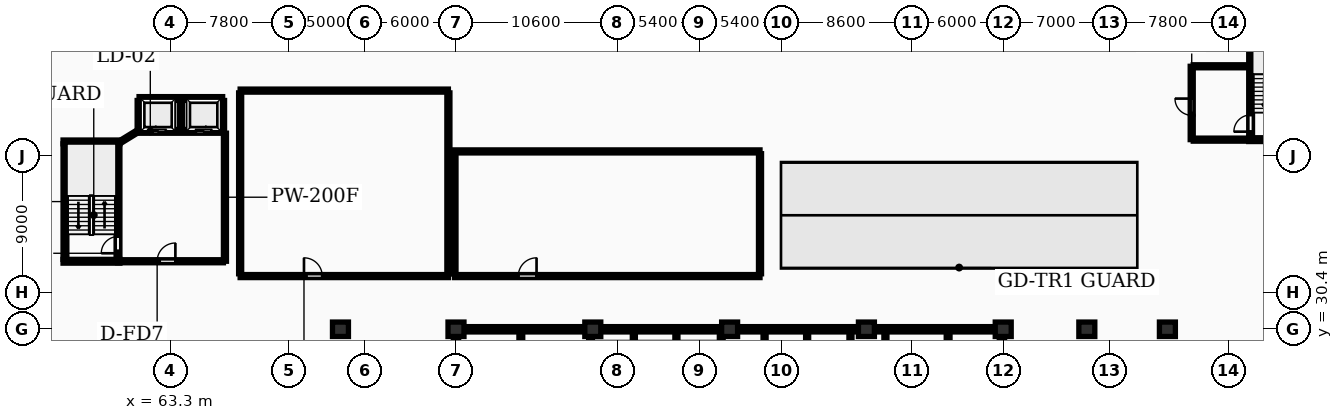
"""IFC4 building model, lengths in metres.
Left out: names, types, materials, properties, quantities, classifications, styles, units other than length and angle.
Written with IfcOpenShell. Run it as: python <this file> out.ifc"""

import sys

from ifc_helpers import new_model, si_unit, direction, frame, frame_2d, origin, origin_2d, place, context, subcontext, project, spatial, rectangle, extrude, element, fill, save


model = new_model("IFC4")
c1 = context("Model", 3, precision=1e-05, world=origin(), true_north=direction((0.0, 1.0)))
c2 = subcontext(c1, "Body", "Model", "MODEL_VIEW")
j1 = project(units=[si_unit("LENGTHUNIT", "METRE"), si_unit("PLANEANGLEUNIT", "RADIAN")], contexts=[c1])
p1 = place(None, origin())
s1 = spatial("IfcSite", under=j1, at=p1, CompositionType="ELEMENT")
p2 = place(p1, origin())
s2 = spatial("IfcBuilding", under=s1, at=p2, CompositionType="ELEMENT")
p3 = place(p2, frame((0.0, 0.0, -10.8)))
s3 = spatial("IfcBuildingStorey", under=s2, at=p3, CompositionType="ELEMENT", Elevation=-10.8)
for number, where, z_axis, x_axis in (
    (1, (74.5, 30.4, -0.45), (0.0, 0.0, 1.0), (1.0, 0.0, 0.0)),
    (2, (82.1, 30.4, -0.45), (0.0, 0.0, 1.0), (1.0, 0.0, 0.0)),
    (3, (91.1, 30.4, -0.45), (0.0, 0.0, 1.0), (1.0, 0.0, 0.0)),
    (4, (100.1, 30.4, -0.45), (0.0, 0.0, 1.0), (1.0, 0.0, 0.0)),
    (5, (109.1, 30.4, -0.45), (0.0, 0.0, 1.0), (1.0, 0.0, 0.0)),
    (6, (118.1, 30.4, -0.45), (0.0, 0.0, 1.0), (1.0, 0.0, 0.0)),
    (7, (123.6, 30.4, -0.45), (0.0, 0.0, 1.0), (1.0, 0.0, 0.0)),
    (8, (128.9, 30.4, -0.45), (0.0, 0.0, 1.0), (1.0, 0.0, 0.0)),
):
    element("IfcColumn", number, at=place(p3, frame(where, z_axis=z_axis, x_axis=x_axis)), inside=s3, PredefinedType="COLUMN", context=c2, shape_type="SweptSolid", body=[
        extrude(rectangle(XDim=1.05, YDim=0.95, at=origin_2d()), origin(), (0.0, 0.0, 1.0), 4.05),
    ])
p4 = place(p3, frame((81.925, 30.4, 0.0), z_axis=(0.0, 0.0, 1.0), x_axis=(1.0, 0.0, 0.0)))
e9 = element("IfcWall", 9, at=p4, inside=s3, PredefinedType="SHEAR", context=c2, shape_type="SweptSolid", body=[
    extrude(rectangle(XDim=36.265, YDim=0.35, at=frame_2d((18.132, 0.0))), origin(), (0.0, 0.0, 1.0), 3.6),
])
for number, where, z_axis, x_axis in (
    (10, (82.1, 18.575, 0.0), (0.0, 0.0, 1.0), (0.0, 1.0, 0.0)),
    (11, (118.015, 18.575, 0.0), (0.0, 0.0, 1.0), (0.0, 1.0, 0.0)),
):
    element("IfcWall", number, at=place(p3, frame(where, z_axis=z_axis, x_axis=x_axis)), inside=s3, PredefinedType="SHEAR", context=c2, shape_type="SweptSolid", body=[
        extrude(rectangle(XDim=11.65, YDim=0.35, at=frame_2d((5.825, 0.0))), origin(), (0.0, 0.0, 1.0), 3.6),
    ])
p5 = place(p3, frame((86.365, 18.6, 0.0), z_axis=(0.0, 0.0, 1.0), x_axis=(0.0, 1.0, 0.0)))
e12 = element("IfcWall", 12, at=p5, inside=s3, PredefinedType="SHEAR", context=c2, shape_type="SweptSolid", body=[
    extrude(rectangle(XDim=11.6, YDim=0.25, at=frame_2d((5.8, 0.0))), origin(), (0.0, 0.0, 1.0), 3.6),
])
p6 = place(p5, frame((0.45, 0.0, 0.0)))
e13 = element("IfcOpeningElement", 13, at=p6, cuts=e12, PredefinedType="OPENING", context=c2, shape_type="SweptSolid", body=[
    extrude(rectangle(XDim=0.85, YDim=2.05, at=frame_2d((0.425, 1.025))), frame((0.0, 0.135, 0.0), z_axis=(0.0, -1.0, 0.0), x_axis=(1.0, 0.0, 0.0)), (0.0, 0.0, 1.0), 0.27),
])
p7 = place(p5, frame((2.05, 0.0, 0.0)))
e14 = element("IfcOpeningElement", 14, at=p7, cuts=e12, PredefinedType="OPENING", context=c2, shape_type="SweptSolid", body=[
    extrude(rectangle(XDim=1.1, YDim=2.1, at=frame_2d((0.55, 1.05))), frame((0.0, 0.135, 0.0), z_axis=(0.0, -1.0, 0.0), x_axis=(1.0, 0.0, 0.0)), (0.0, 0.0, 1.0), 0.27),
])
p8 = place(p5, frame((9.95, 0.0, 0.0)))
e15 = element("IfcOpeningElement", 15, at=p8, cuts=e12, PredefinedType="OPENING", context=c2, shape_type="SweptSolid", body=[
    extrude(rectangle(XDim=0.85, YDim=2.05, at=frame_2d((0.425, 1.025))), frame((0.0, 0.135, 0.0), z_axis=(0.0, -1.0, 0.0), x_axis=(1.0, 0.0, 0.0)), (0.0, 0.0, 1.0), 0.27),
])
p9 = place(p3, frame((90.95, 18.6, 0.0), z_axis=(0.0, 0.0, 1.0), x_axis=(0.0, 1.0, 0.0)))
e16 = element("IfcWall", 16, at=p9, inside=s3, PredefinedType="SHEAR", context=c2, shape_type="SweptSolid", body=[
    extrude(rectangle(XDim=11.6, YDim=0.25, at=frame_2d((5.8, 0.0))), origin(), (0.0, 0.0, 1.0), 3.6),
])
p10 = place(p9, frame((4.6, 0.0, 0.0)))
e17 = element("IfcOpeningElement", 17, at=p10, cuts=e16, PredefinedType="OPENING", context=c2, shape_type="SweptSolid", body=[
    extrude(rectangle(XDim=1.1, YDim=2.1, at=frame_2d((0.55, 1.05))), frame((0.0, 0.135, 0.0), z_axis=(0.0, -1.0, 0.0), x_axis=(1.0, 0.0, 0.0)), (0.0, 0.0, 1.0), 0.27),
])
for number, where, z_axis, x_axis in (
    (18, (93.8, 27.38, 0.0), (0.0, 0.0, 1.0), (0.0, 1.0, 0.0)),
    (19, (96.6, 27.38, 0.0), (0.0, 0.0, 1.0), (0.0, 1.0, 0.0)),
):
    element("IfcWall", number, at=place(p3, frame(where, z_axis=z_axis, x_axis=x_axis)), inside=s3, PredefinedType="PARTITIONING", context=c2, shape_type="SweptSolid", body=[
        extrude(rectangle(XDim=2.82, YDim=0.2, at=frame_2d((1.41, 0.0))), origin(), (0.0, 0.0, 1.0), 3.3),
    ])
p11 = place(p3, frame((99.55, 27.25, 0.0), z_axis=(0.0, 0.0, 1.0), x_axis=(0.0, 1.0, 0.0)))
e20 = element("IfcWall", 20, at=p11, inside=s3, PredefinedType="SHEAR", context=c2, shape_type="SweptSolid", body=[
    extrude(rectangle(XDim=2.95, YDim=0.25, at=frame_2d((1.475, 0.0))), origin(), (0.0, 0.0, 1.0), 3.6),
])
for number, where, z_axis, x_axis in (
    (21, (102.4, 27.38, 0.0), (0.0, 0.0, 1.0), (0.0, 1.0, 0.0)),
    (22, (105.2, 27.38, 0.0), (0.0, 0.0, 1.0), (0.0, 1.0, 0.0)),
    (23, (108.05, 27.38, 0.0), (0.0, 0.0, 1.0), (0.0, 1.0, 0.0)),
):
    element("IfcWall", number, at=place(p3, frame(where, z_axis=z_axis, x_axis=x_axis)), inside=s3, PredefinedType="PARTITIONING", context=c2, shape_type="SweptSolid", body=[
        extrude(rectangle(XDim=2.82, YDim=0.2, at=frame_2d((1.41, 0.0))), origin(), (0.0, 0.0, 1.0), 3.3),
    ])
p12 = place(p3, frame((110.35, 18.6, 0.0), z_axis=(0.0, 0.0, 1.0), x_axis=(0.0, 1.0, 0.0)))
e24 = element("IfcWall", 24, at=p12, inside=s3, PredefinedType="PARTITIONING", context=c2, shape_type="SweptSolid", body=[
    extrude(rectangle(XDim=11.6, YDim=0.2, at=frame_2d((5.8, 0.0))), origin(), (0.0, 0.0, 1.0), 3.3),
])
p13 = place(p12, frame((5.2, 0.0, 0.0)))
e25 = element("IfcOpeningElement", 25, at=p13, cuts=e24, PredefinedType="OPENING", context=c2, shape_type="SweptSolid", body=[
    extrude(rectangle(XDim=1.1, YDim=2.15, at=frame_2d((0.55, 1.075))), frame((0.0, 0.11, 0.0), z_axis=(0.0, -1.0, 0.0), x_axis=(1.0, 0.0, 0.0)), (0.0, 0.0, 1.0), 0.22),
])
p14 = place(p3, frame((114.475, 18.6, 0.0), z_axis=(0.0, 0.0, 1.0), x_axis=(0.0, 1.0, 0.0)))
e26 = element("IfcWall", 26, at=p14, inside=s3, PredefinedType="SHEAR", context=c2, shape_type="SweptSolid", body=[
    extrude(rectangle(XDim=11.6, YDim=0.25, at=frame_2d((5.8, 0.0))), origin(), (0.0, 0.0, 1.0), 3.6),
])
p15 = place(p14, frame((0.45, 0.0, 0.0)))
e27 = element("IfcOpeningElement", 27, at=p15, cuts=e26, PredefinedType="OPENING", context=c2, shape_type="SweptSolid", body=[
    extrude(rectangle(XDim=0.85, YDim=2.05, at=frame_2d((0.425, 1.025))), frame((0.0, 0.135, 0.0), z_axis=(0.0, -1.0, 0.0), x_axis=(1.0, 0.0, 0.0)), (0.0, 0.0, 1.0), 0.27),
])
p16 = place(p14, frame((2.05, 0.0, 0.0)))
e28 = element("IfcOpeningElement", 28, at=p16, cuts=e26, PredefinedType="OPENING", context=c2, shape_type="SweptSolid", body=[
    extrude(rectangle(XDim=1.1, YDim=2.1, at=frame_2d((0.55, 1.05))), frame((0.0, 0.135, 0.0), z_axis=(0.0, -1.0, 0.0), x_axis=(1.0, 0.0, 0.0)), (0.0, 0.0, 1.0), 0.27),
])
p17 = place(p14, frame((9.95, 0.0, 0.0)))
e29 = element("IfcOpeningElement", 29, at=p17, cuts=e26, PredefinedType="OPENING", context=c2, shape_type="SweptSolid", body=[
    extrude(rectangle(XDim=0.85, YDim=2.05, at=frame_2d((0.425, 1.025))), frame((0.0, 0.135, 0.0), z_axis=(0.0, -1.0, 0.0), x_axis=(1.0, 0.0, 0.0)), (0.0, 0.0, 1.0), 0.27),
])
p18 = place(p3, frame((56.375, 35.0, 0.0), z_axis=(0.0, 0.0, 1.0), x_axis=(0.0, 1.0, 0.0)))
e30 = element("IfcWall", 30, at=p18, inside=s3, PredefinedType="SHEAR", context=c2, shape_type="SweptSolid", body=[
    extrude(rectangle(XDim=7.6, YDim=0.25, at=frame_2d((3.8, 0.0))), origin(), (0.0, 0.0, 1.0), 3.6),
])
for number, where, z_axis, x_axis in (
    (31, (56.25, 42.725, 0.0), (0.0, 0.0, 1.0), (1.0, 0.0, 0.0)),
    (32, (56.25, 34.875, 0.0), (0.0, 0.0, 1.0), (1.0, 0.0, 0.0)),
):
    element("IfcWall", number, at=place(p3, frame(where, z_axis=z_axis, x_axis=x_axis)), inside=s3, PredefinedType="SHEAR", context=c2, shape_type="SweptSolid", body=[
        extrude(rectangle(XDim=3.74, YDim=0.25, at=frame_2d((1.87, 0.0))), origin(), (0.0, 0.0, 1.0), 3.6),
    ])
p19 = place(p3, frame((59.865, 35.0, 0.0), z_axis=(0.0, 0.0, 1.0), x_axis=(0.0, 1.0, 0.0)))
e33 = element("IfcWall", 33, at=p19, inside=s3, PredefinedType="SHEAR", context=c2, shape_type="SweptSolid", body=[
    extrude(rectangle(XDim=7.6, YDim=0.25, at=frame_2d((3.8, 0.0))), origin(), (0.0, 0.0, 1.0), 3.6),
])
p20 = place(p19, frame((0.4, 0.0, 0.0)))
e34 = element("IfcOpeningElement", 34, at=p20, cuts=e33, PredefinedType="OPENING", context=c2, shape_type="SweptSolid", body=[
    extrude(rectangle(XDim=1.1, YDim=2.1, at=frame_2d((0.55, 1.05))), frame((0.0, 0.135, 0.0), z_axis=(0.0, -1.0, 0.0), x_axis=(1.0, 0.0, 0.0)), (0.0, 0.0, 1.0), 0.27),
])
p21 = place(p3, frame((61.25, 43.42, 0.0), z_axis=(0.0, 0.0, 1.0), x_axis=(1.0, 0.0, 0.0)))
e35 = element("IfcWall", 35, at=p21, inside=s3, PredefinedType="SHEAR", context=c2, shape_type="SweptSolid", body=[
    extrude(rectangle(XDim=5.5, YDim=0.25, at=frame_2d((2.75, 0.0))), origin(), (0.0, 0.0, 1.0), 3.6),
])
p22 = place(p21, frame((0.74, 0.0, 0.0)))
e36 = element("IfcOpeningElement", 36, at=p22, cuts=e35, PredefinedType="OPENING", context=c2, shape_type="SweptSolid", body=[
    extrude(rectangle(XDim=1.02, YDim=2.12, at=frame_2d((0.51, 1.06))), frame((0.0, 0.135, 0.0), z_axis=(0.0, -1.0, 0.0), x_axis=(1.0, 0.0, 0.0)), (0.0, 0.0, 1.0), 0.27),
])
p23 = place(p21, frame((3.74, 0.0, 0.0)))
e37 = element("IfcOpeningElement", 37, at=p23, cuts=e35, PredefinedType="OPENING", context=c2, shape_type="SweptSolid", body=[
    extrude(rectangle(XDim=1.02, YDim=2.12, at=frame_2d((0.51, 1.06))), frame((0.0, 0.135, 0.0), z_axis=(0.0, -1.0, 0.0), x_axis=(1.0, 0.0, 0.0)), (0.0, 0.0, 1.0), 0.27),
])
p24 = place(p3, frame((61.25, 45.58, 0.0), z_axis=(0.0, 0.0, 1.0), x_axis=(1.0, 0.0, 0.0)))
e38 = element("IfcWall", 38, at=p24, inside=s3, PredefinedType="SHEAR", context=c2, shape_type="SweptSolid", body=[
    extrude(rectangle(XDim=5.5, YDim=0.25, at=frame_2d((2.75, 0.0))), origin(), (0.0, 0.0, 1.0), 3.6),
])
for number, where, z_axis, x_axis in (
    (39, (61.25, 43.55, 0.0), (0.0, 0.0, 1.0), (0.0, 1.0, 0.0)),
    (40, (66.75, 43.55, 0.0), (0.0, 0.0, 1.0), (0.0, 1.0, 0.0)),
):
    element("IfcWall", number, at=place(p3, frame(where, z_axis=z_axis, x_axis=x_axis)), inside=s3, PredefinedType="SHEAR", context=c2, shape_type="SweptSolid", body=[
        extrude(rectangle(XDim=1.9, YDim=0.25, at=frame_2d((0.95, 0.0))), origin(), (0.0, 0.0, 1.0), 3.6),
    ])
p25 = place(p3, frame((64.0, 43.55, 0.0), z_axis=(0.0, 0.0, 1.0), x_axis=(0.0, 1.0, 0.0)))
e41 = element("IfcWall", 41, at=p25, inside=s3, PredefinedType="PARTITIONING", context=c2, shape_type="SweptSolid", body=[
    extrude(rectangle(XDim=1.9, YDim=0.2, at=frame_2d((0.95, 0.0))), origin(), (0.0, 0.0, 1.0), 3.3),
])
p26 = place(p3, frame((59.84, 34.875, 0.0), z_axis=(0.0, 0.0, 1.0), x_axis=(1.0, 0.0, 0.0)))
e42 = element("IfcWall", 42, at=p26, inside=s3, PredefinedType="PARTITIONING", context=c2, shape_type="SweptSolid", body=[
    extrude(rectangle(XDim=6.96, YDim=0.2, at=frame_2d((3.48, 0.0))), origin(), (0.0, 0.0, 1.0), 3.3),
])
p27 = place(p26, frame((2.6, 0.0, 0.0)))
e43 = element("IfcOpeningElement", 43, at=p27, cuts=e42, PredefinedType="OPENING", context=c2, shape_type="SweptSolid", body=[
    extrude(rectangle(XDim=1.2, YDim=2.18, at=frame_2d((0.6, 1.09))), frame((0.0, 0.11, 0.0), z_axis=(0.0, -1.0, 0.0), x_axis=(1.0, 0.0, 0.0)), (0.0, 0.0, 1.0), 0.22),
])
p28 = place(p3, frame((66.9, 34.875, 0.0), z_axis=(0.0, 0.0, 1.0), x_axis=(0.0, 1.0, 0.0)))
e44 = element("IfcWall", 44, at=p28, inside=s3, PredefinedType="PARTITIONING", context=c2, shape_type="SweptSolid", body=[
    extrude(rectangle(XDim=8.425, YDim=0.2, at=frame_2d((4.212, 0.0))), origin(), (0.0, 0.0, 1.0), 3.3),
])
p29 = place(p3, frame((60.02, 42.725, 0.0), z_axis=(0.0, 0.0, 1.0), x_axis=(0.851822584555, 0.523830396638, 0.0)))
e45 = element("IfcWall", 45, at=p29, inside=s3, PredefinedType="PARTITIONING", context=c2, shape_type="SweptSolid", body=[
    extrude(rectangle(XDim=1.326, YDim=0.2, at=frame_2d((0.663, 0.0))), origin(), (0.0, 0.0, 1.0), 3.3),
])
p30 = place(p3, frame((134.375, 43.0, 0.0), z_axis=(0.0, 0.0, 1.0), x_axis=(0.0, 1.0, 0.0)))
e46 = element("IfcWall", 46, at=p30, inside=s3, PredefinedType="SHEAR", context=c2, shape_type="SweptSolid", body=[
    extrude(rectangle(XDim=7.6, YDim=0.25, at=frame_2d((3.8, 0.0))), origin(), (0.0, 0.0, 1.0), 3.6),
])
p31 = place(p30, frame((0.4, 0.0, 0.0)))
e47 = element("IfcOpeningElement", 47, at=p31, cuts=e46, PredefinedType="OPENING", context=c2, shape_type="SweptSolid", body=[
    extrude(rectangle(XDim=1.1, YDim=2.1, at=frame_2d((0.55, 1.05))), frame((0.0, 0.135, 0.0), z_axis=(0.0, -1.0, 0.0), x_axis=(1.0, 0.0, 0.0)), (0.0, 0.0, 1.0), 0.27),
])
p32 = place(p3, frame((134.25, 42.875, 0.0), z_axis=(0.0, 0.0, 1.0), x_axis=(1.0, 0.0, 0.0)))
e48 = element("IfcWall", 48, at=p32, inside=s3, PredefinedType="SHEAR", context=c2, shape_type="SweptSolid", body=[
    extrude(rectangle(XDim=3.74, YDim=0.25, at=frame_2d((1.87, 0.0))), origin(), (0.0, 0.0, 1.0), 3.6),
])
p33 = place(p3, frame((130.5, 42.875, 0.0), z_axis=(0.0, 0.0, 1.0), x_axis=(0.0, 1.0, 0.0)))
e49 = element("IfcWall", 49, at=p33, inside=s3, PredefinedType="PARTITIONING", context=c2, shape_type="SweptSolid", body=[
    extrude(rectangle(XDim=4.825, YDim=0.2, at=frame_2d((2.413, 0.0))), origin(), (0.0, 0.0, 1.0), 3.3),
])
p34 = place(p33, frame((1.6, 0.0, 0.0)))
e50 = element("IfcOpeningElement", 50, at=p34, cuts=e49, PredefinedType="OPENING", context=c2, shape_type="SweptSolid", body=[
    extrude(rectangle(XDim=1.1, YDim=2.15, at=frame_2d((0.55, 1.075))), frame((0.0, 0.11, 0.0), z_axis=(0.0, -1.0, 0.0), x_axis=(1.0, 0.0, 0.0)), (0.0, 0.0, 1.0), 0.22),
])
for number, where, z_axis, x_axis in (
    (51, (130.6, 42.875, 0.0), (0.0, 0.0, 1.0), (1.0, 0.0, 0.0)),
    (52, (130.6, 47.7, 0.0), (0.0, 0.0, 1.0), (1.0, 0.0, 0.0)),
):
    element("IfcWall", number, at=place(p3, frame(where, z_axis=z_axis, x_axis=x_axis)), inside=s3, PredefinedType="PARTITIONING", context=c2, shape_type="SweptSolid", body=[
        extrude(rectangle(XDim=3.65, YDim=0.2, at=frame_2d((1.825, 0.0))), origin(), (0.0, 0.0, 1.0), 3.3),
    ])
p35 = place(p3, frame((67.9, 33.9, 0.0), z_axis=(0.0, 0.0, 1.0), x_axis=(1.0, 0.0, 0.0)))
e53 = element("IfcWall", 53, at=p35, inside=s3, PredefinedType="PARTITIONING", context=c2, shape_type="SweptSolid", body=[
    extrude(rectangle(XDim=13.7, YDim=0.2, at=frame_2d((6.85, 0.0))), origin(), (0.0, 0.0, 1.0), 3.3),
])
p36 = place(p35, frame((4.2, 0.0, 0.0)))
e54 = element("IfcOpeningElement", 54, at=p36, cuts=e53, PredefinedType="OPENING", context=c2, shape_type="SweptSolid", body=[
    extrude(rectangle(XDim=1.2, YDim=2.15, at=frame_2d((0.6, 1.075))), frame((0.0, 0.11, 0.0), z_axis=(0.0, -1.0, 0.0), x_axis=(1.0, 0.0, 0.0)), (0.0, 0.0, 1.0), 0.22),
])
p37 = place(p3, frame((67.9, 46.1, 0.0), z_axis=(0.0, 0.0, 1.0), x_axis=(1.0, 0.0, 0.0)))
e55 = element("IfcWall", 55, at=p37, inside=s3, PredefinedType="PARTITIONING", context=c2, shape_type="SweptSolid", body=[
    extrude(rectangle(XDim=13.7, YDim=0.2, at=frame_2d((6.85, 0.0))), origin(), (0.0, 0.0, 1.0), 3.3),
])
for number, where, z_axis, x_axis in (
    (56, (67.9, 34.05, 0.0), (0.0, 0.0, 1.0), (0.0, 1.0, 0.0)),
    (57, (81.6, 34.05, 0.0), (0.0, 0.0, 1.0), (0.0, 1.0, 0.0)),
):
    element("IfcWall", number, at=place(p3, frame(where, z_axis=z_axis, x_axis=x_axis)), inside=s3, PredefinedType="PARTITIONING", context=c2, shape_type="SweptSolid", body=[
        extrude(rectangle(XDim=11.9, YDim=0.2, at=frame_2d((5.95, 0.0))), origin(), (0.0, 0.0, 1.0), 3.3),
    ])
p38 = place(p3, frame((82.0, 33.9, 0.0), z_axis=(0.0, 0.0, 1.0), x_axis=(1.0, 0.0, 0.0)))
e58 = element("IfcWall", 58, at=p38, inside=s3, PredefinedType="PARTITIONING", context=c2, shape_type="SweptSolid", body=[
    extrude(rectangle(XDim=20.1, YDim=0.2, at=frame_2d((10.05, 0.0))), origin(), (0.0, 0.0, 1.0), 3.3),
])
p39 = place(p38, frame((4.2, 0.0, 0.0)))
e59 = element("IfcOpeningElement", 59, at=p39, cuts=e58, PredefinedType="OPENING", context=c2, shape_type="SweptSolid", body=[
    extrude(rectangle(XDim=1.2, YDim=2.15, at=frame_2d((0.6, 1.075))), frame((0.0, 0.11, 0.0), z_axis=(0.0, -1.0, 0.0), x_axis=(1.0, 0.0, 0.0)), (0.0, 0.0, 1.0), 0.22),
])
p40 = place(p3, frame((82.0, 42.1, 0.0), z_axis=(0.0, 0.0, 1.0), x_axis=(1.0, 0.0, 0.0)))
e60 = element("IfcWall", 60, at=p40, inside=s3, PredefinedType="PARTITIONING", context=c2, shape_type="SweptSolid", body=[
    extrude(rectangle(XDim=20.1, YDim=0.2, at=frame_2d((10.05, 0.0))), origin(), (0.0, 0.0, 1.0), 3.3),
])
for number, where, z_axis, x_axis in (
    (61, (82.0, 34.05, 0.0), (0.0, 0.0, 1.0), (0.0, 1.0, 0.0)),
    (62, (102.1, 34.05, 0.0), (0.0, 0.0, 1.0), (0.0, 1.0, 0.0)),
):
    element("IfcWall", number, at=place(p3, frame(where, z_axis=z_axis, x_axis=x_axis)), inside=s3, PredefinedType="PARTITIONING", context=c2, shape_type="SweptSolid", body=[
        extrude(rectangle(XDim=7.9, YDim=0.2, at=frame_2d((3.95, 0.0))), origin(), (0.0, 0.0, 1.0), 3.3),
    ])
p41 = place(p20, origin())
e63 = element("IfcDoor", 63, at=p41, inside=s3, OperationType="SINGLE_SWING_LEFT", PredefinedType="DOOR", context=c2, shape_type="SweptSolid", body=[
    extrude(rectangle(XDim=1.1, YDim=2.1, at=frame_2d((0.55, 1.05))), frame((0.0, 0.025, 0.0), z_axis=(0.0, -1.0, 0.0), x_axis=(1.0, 0.0, 0.0)), (0.0, 0.0, 1.0), 0.05),
])
fill(e34, e63)
p42 = place(p22, origin())
e64 = element("IfcDoor", 64, at=p42, inside=s3, OperationType="SLIDING_TO_LEFT", PredefinedType="DOOR", context=c2, shape_type="SweptSolid", body=[
    extrude(rectangle(XDim=1.02, YDim=2.12, at=frame_2d((0.51, 1.06))), frame((0.0, 0.025, 0.0), z_axis=(0.0, -1.0, 0.0), x_axis=(1.0, 0.0, 0.0)), (0.0, 0.0, 1.0), 0.05),
])
fill(e36, e64)
p43 = place(p23, origin())
e65 = element("IfcDoor", 65, at=p43, inside=s3, OperationType="SLIDING_TO_RIGHT", PredefinedType="DOOR", context=c2, shape_type="SweptSolid", body=[
    extrude(rectangle(XDim=1.02, YDim=2.12, at=frame_2d((0.51, 1.06))), frame((0.0, 0.025, 0.0), z_axis=(0.0, -1.0, 0.0), x_axis=(1.0, 0.0, 0.0)), (0.0, 0.0, 1.0), 0.05),
])
fill(e37, e65)
p44 = place(p27, origin())
e66 = element("IfcDoor", 66, at=p44, inside=s3, OperationType="SINGLE_SWING_RIGHT", PredefinedType="DOOR", context=c2, shape_type="SweptSolid", body=[
    extrude(rectangle(XDim=1.2, YDim=2.18, at=frame_2d((0.6, 1.09))), frame((0.0, 0.025, 0.0), z_axis=(0.0, -1.0, 0.0), x_axis=(1.0, 0.0, 0.0)), (0.0, 0.0, 1.0), 0.05),
])
fill(e43, e66)
p45 = place(p31, origin())
e67 = element("IfcDoor", 67, at=p45, inside=s3, OperationType="SINGLE_SWING_LEFT", PredefinedType="DOOR", context=c2, shape_type="SweptSolid", body=[
    extrude(rectangle(XDim=1.1, YDim=2.1, at=frame_2d((0.55, 1.05))), frame((0.0, 0.025, 0.0), z_axis=(0.0, -1.0, 0.0), x_axis=(1.0, 0.0, 0.0)), (0.0, 0.0, 1.0), 0.05),
])
fill(e47, e67)
p46 = place(p34, origin())
e68 = element("IfcDoor", 68, at=p46, inside=s3, OperationType="SINGLE_SWING_RIGHT", PredefinedType="DOOR", context=c2, shape_type="SweptSolid", body=[
    extrude(rectangle(XDim=1.1, YDim=2.15, at=frame_2d((0.55, 1.075))), frame((0.0, 0.025, 0.0), z_axis=(0.0, -1.0, 0.0), x_axis=(1.0, 0.0, 0.0)), (0.0, 0.0, 1.0), 0.05),
])
fill(e50, e68)
p47 = place(p36, origin())
e69 = element("IfcDoor", 69, at=p47, inside=s3, OperationType="SINGLE_SWING_LEFT", PredefinedType="DOOR", context=c2, shape_type="SweptSolid", body=[
    extrude(rectangle(XDim=1.2, YDim=2.15, at=frame_2d((0.6, 1.075))), frame((0.0, 0.025, 0.0), z_axis=(0.0, -1.0, 0.0), x_axis=(1.0, 0.0, 0.0)), (0.0, 0.0, 1.0), 0.05),
])
fill(e54, e69)
p48 = place(p39, origin())
e70 = element("IfcDoor", 70, at=p48, inside=s3, OperationType="SINGLE_SWING_RIGHT", PredefinedType="DOOR", context=c2, shape_type="SweptSolid", body=[
    extrude(rectangle(XDim=1.2, YDim=2.15, at=frame_2d((0.6, 1.075))), frame((0.0, 0.025, 0.0), z_axis=(0.0, -1.0, 0.0), x_axis=(1.0, 0.0, 0.0)), (0.0, 0.0, 1.0), 0.05),
])
fill(e59, e70)
save(model, sys.argv[1])
